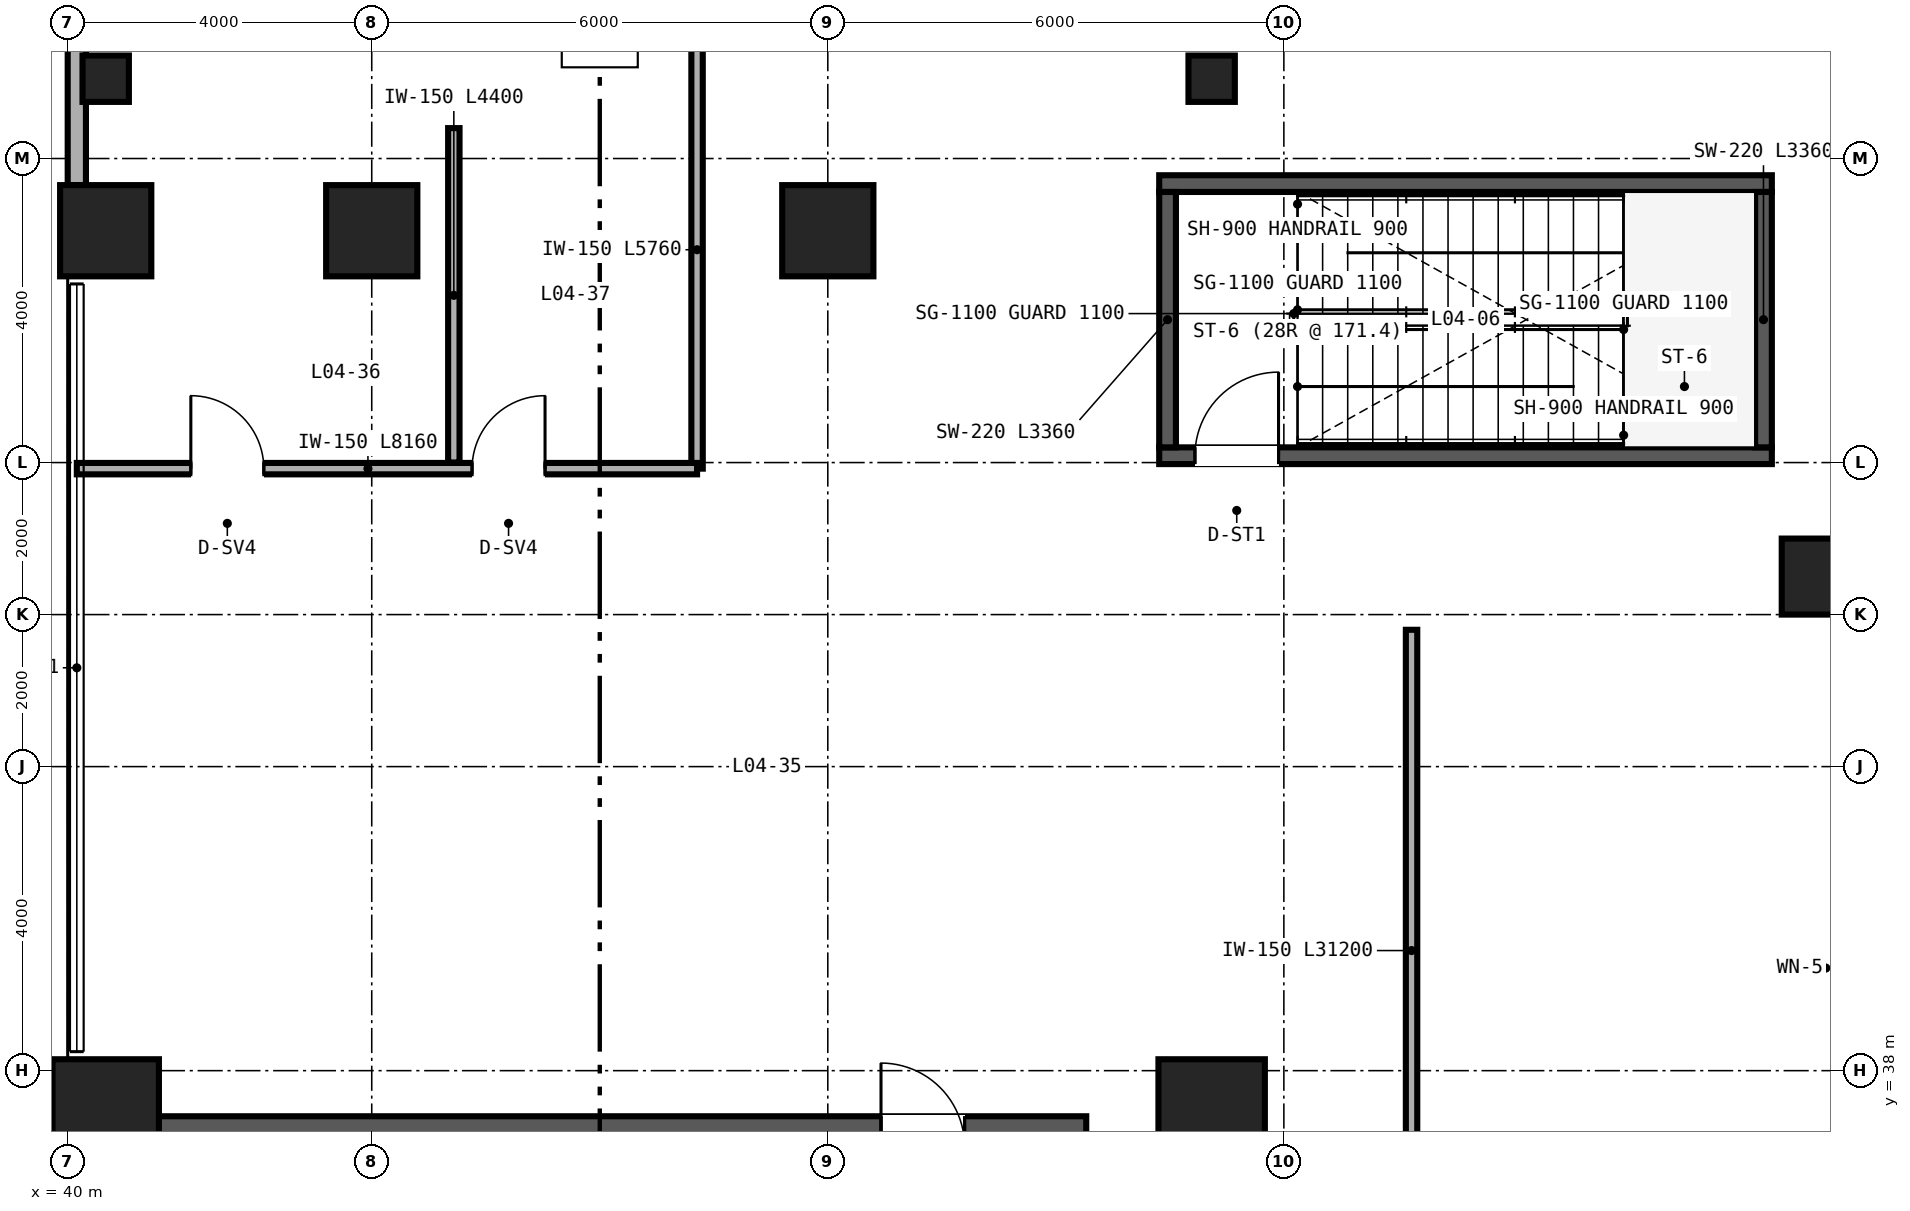
"""IFC4 building model, lengths in metres.
Left out: names, types, materials, properties, quantities, classifications, styles, units other than length and angle.
Written with IfcOpenShell. Run it as: python <this file> out.ifc"""

import sys

from ifc_helpers import new_model, si_unit, direction, frame, frame_2d, origin, origin_2d, place, context, subcontext, project, spatial, rectangle, hollow_circle, extrude, source, transform, mapped, element, fill, save


model = new_model("IFC4")
c1 = context("Model", 3, precision=1e-05, world=origin(), true_north=direction((0.0, 1.0)))
c2 = subcontext(c1, "Body", "Model", "MODEL_VIEW")
j1 = project(units=[si_unit("LENGTHUNIT", "METRE"), si_unit("PLANEANGLEUNIT", "RADIAN")], contexts=[c1])
p1 = place(None, origin())
s1 = spatial("IfcSite", under=j1, at=p1, CompositionType="ELEMENT")
p2 = place(p1, origin())
s2 = spatial("IfcBuilding", under=s1, at=p2, CompositionType="ELEMENT")
p3 = place(p2, frame((0.0, 0.0, 19.2)))
s3 = spatial("IfcBuildingStorey", under=s2, at=p3, CompositionType="ELEMENT", Elevation=19.2)
p4 = place(p3, frame((40.6, 37.0, 0.0), z_axis=(0.0, 0.0, 1.0), x_axis=(1.0, 0.0, 0.0)))
e1 = element("IfcWall", 1, at=p4, inside=s3, PredefinedType="SHEAR", context=c2, shape_type="SweptSolid", body=[
    extrude(rectangle(XDim=12.8, YDim=0.8, at=frame_2d((6.4, 0.0))), origin(), (0.0, 0.0, 1.0), 4.48),
])
p5 = place(p4, frame((10.1, 0.0, 0.0)))
e2 = element("IfcOpeningElement", 2, at=p5, cuts=e1, PredefinedType="OPENING", context=c2, shape_type="SweptSolid", body=[
    extrude(rectangle(XDim=1.1, YDim=2.15, at=frame_2d((0.55, 1.075))), frame((0.0, 0.41, 0.0), z_axis=(0.0, -1.0, 0.0), x_axis=(1.0, 0.0, 0.0)), (0.0, 0.0, 1.0), 0.82),
])
p6 = place(p3, frame((54.36, 46.09, 0.0), z_axis=(0.0, 0.0, 1.0), x_axis=(1.0, 0.0, 0.0)))
e3 = element("IfcWall", 3, at=p6, inside=s3, PredefinedType="SHEAR", context=c2, shape_type="SweptSolid", body=[
    extrude(rectangle(XDim=8.06, YDim=0.22, at=frame_2d((4.03, 0.0))), origin(), (0.0, 0.0, 1.0), 4.6),
])
p7 = place(p6, frame((0.47, 0.0, 0.0)))
e4 = element("IfcOpeningElement", 4, at=p7, cuts=e3, PredefinedType="OPENING", context=c2, shape_type="SweptSolid", body=[
    extrude(rectangle(XDim=1.1, YDim=2.15, at=frame_2d((0.55, 1.075))), frame((0.0, 0.12, 0.0), z_axis=(0.0, -1.0, 0.0), x_axis=(1.0, 0.0, 0.0)), (0.0, 0.0, 1.0), 0.24),
])
p8 = place(p3, frame((54.36, 49.67, 0.0), z_axis=(0.0, 0.0, 1.0), x_axis=(1.0, 0.0, 0.0)))
e5 = element("IfcWall", 5, at=p8, inside=s3, PredefinedType="SHEAR", context=c2, shape_type="SweptSolid", body=[
    extrude(rectangle(XDim=8.06, YDim=0.22, at=frame_2d((4.03, 0.0))), origin(), (0.0, 0.0, 1.0), 4.6),
])
for number, where, z_axis, x_axis in (
    (6, (54.47, 46.2, 0.0), (0.0, 0.0, 1.0), (0.0, 1.0, 0.0)),
    (7, (62.31, 46.2, 0.0), (0.0, 0.0, 1.0), (0.0, 1.0, 0.0)),
):
    element("IfcWall", number, at=place(p3, frame(where, z_axis=z_axis, x_axis=x_axis)), inside=s3, PredefinedType="SHEAR", context=c2, shape_type="SweptSolid", body=[
        extrude(rectangle(XDim=3.36, YDim=0.22, at=frame_2d((1.68, 0.0))), origin(), (0.0, 0.0, 1.0), 4.6),
    ])
m1 = source(origin(), c2, "Body", "SweptSolid", [
    extrude(rectangle(XDim=1.0, YDim=1.0, at=origin_2d()), origin(), (0.0, 0.0, 1.0), 4.48),
])
p9 = place(p3, frame((63.05, 44.5, 0.0), z_axis=(0.0, 0.0, 1.0), x_axis=(1.0, 0.0, 0.0)))
e8 = element("IfcColumn", 8, at=p9, inside=s3, PredefinedType="COLUMN", context=c2, shape_type="MappedRepresentation", body=[
    mapped(m1, transform((0.0, 0.0, 0.0), scale=1.0)),
])
m2 = source(origin(), c2, "Body", "SweptSolid", [
    extrude(hollow_circle(Radius=0.305, WallThickness=0.025, at=origin_2d()), origin(), (0.0, 0.0, 1.0), 4.48),
])
for number, where, z_axis, x_axis in (
    (9, (40.5, 51.05, 0.0), (0.0, 0.0, 1.0), (1.0, 0.0, 0.0)),
    (10, (55.05, 51.05, 0.0), (0.0, 0.0, 1.0), (1.0, 0.0, 0.0)),
):
    element("IfcColumn", number, at=place(p3, frame(where, z_axis=z_axis, x_axis=x_axis)), inside=s3, PredefinedType="COLUMN", context=c2, shape_type="MappedRepresentation", body=[
        mapped(m2, transform((0.0, 0.0, 0.0), scale=1.0)),
    ])
m3 = source(origin(), c2, "Body", "SweptSolid", [
    extrude(rectangle(XDim=1.4, YDim=1.4, at=origin_2d()), origin(), (0.0, 0.0, 1.0), 4.48),
])
for number, where, z_axis, x_axis in (
    (11, (40.5, 37.45, 0.0), (0.0, 0.0, 1.0), (1.0, 0.0, 0.0)),
    (12, (55.05, 37.45, 0.0), (0.0, 0.0, 1.0), (1.0, 0.0, 0.0)),
):
    element("IfcColumn", number, at=place(p3, frame(where, z_axis=z_axis, x_axis=x_axis)), inside=s3, PredefinedType="COLUMN", context=c2, shape_type="MappedRepresentation", body=[
        mapped(m3, transform((0.0, 0.0, 0.0), scale=1.0)),
    ])
m4 = source(origin(), c2, "Body", "SweptSolid", [
    extrude(rectangle(XDim=1.2, YDim=1.2, at=origin_2d()), origin(), (0.0, 0.0, 1.0), 4.48),
])
for number, where, z_axis, x_axis in (
    (13, (40.5, 49.05, 0.0), (0.0, 0.0, 1.0), (1.0, 0.0, 0.0)),
    (14, (44.0, 49.05, 0.0), (0.0, 0.0, 1.0), (1.0, 0.0, 0.0)),
    (15, (50.0, 49.05, 0.0), (0.0, 0.0, 1.0), (1.0, 0.0, 0.0)),
):
    element("IfcColumn", number, at=place(p3, frame(where, z_axis=z_axis, x_axis=x_axis)), inside=s3, PredefinedType="COLUMN", context=c2, shape_type="MappedRepresentation", body=[
        mapped(m4, transform((0.0, 0.0, 0.0), scale=1.0)),
    ])
p10 = place(p3, frame((40.12, 49.65, 0.0), z_axis=(0.0, 0.0, 1.0), x_axis=(0.0, 1.0, 0.0)))
e16 = element("IfcWall", 16, at=p10, inside=s3, PredefinedType="SOLIDWALL", context=c2, shape_type="SweptSolid", body=[
    extrude(rectangle(XDim=2.05, YDim=0.24, at=frame_2d((1.025, 0.0))), origin(), (0.0, 0.0, 1.0), 3.532),
])
p11 = place(p3, frame((45.08, 46.0, 0.0), z_axis=(0.0, 0.0, 1.0), x_axis=(0.0, 1.0, 0.0)))
e17 = element("IfcWall", 17, at=p11, inside=s3, PredefinedType="PARTITIONING", context=c2, shape_type="SweptSolid", body=[
    extrude(rectangle(XDim=4.4, YDim=0.15, at=frame_2d((2.2, 0.0))), origin(), (0.0, 0.0, 1.0), 3.787),
])
p12 = place(p3, frame((48.28, 45.92, 0.0), z_axis=(0.0, 0.0, 1.0), x_axis=(0.0, 1.0, 0.0)))
e18 = element("IfcWall", 18, at=p12, inside=s3, PredefinedType="PARTITIONING", context=c2, shape_type="SweptSolid", body=[
    extrude(rectangle(XDim=5.76, YDim=0.15, at=frame_2d((2.88, 0.0))), origin(), (0.0, 0.0, 1.0), 3.553),
])
p13 = place(p3, frame((40.12, 45.92, 0.0), z_axis=(0.0, 0.0, 1.0), x_axis=(1.0, 0.0, 0.0)))
e19 = element("IfcWall", 19, at=p13, inside=s3, PredefinedType="PARTITIONING", context=c2, shape_type="SweptSolid", body=[
    extrude(rectangle(XDim=8.16, YDim=0.15, at=frame_2d((4.08, 0.0))), origin(), (0.0, 0.0, 1.0), 3.701),
])
p14 = place(p13, frame((1.5, 0.0, 0.0)))
e20 = element("IfcOpeningElement", 20, at=p14, cuts=e19, PredefinedType="OPENING", context=c2, shape_type="SweptSolid", body=[
    extrude(rectangle(XDim=0.96, YDim=2.15, at=frame_2d((0.48, 1.075))), frame((0.0, 0.085, 0.0), z_axis=(0.0, -1.0, 0.0), x_axis=(1.0, 0.0, 0.0)), (0.0, 0.0, 1.0), 0.17),
])
p15 = place(p13, frame((5.2, 0.0, 0.0)))
e21 = element("IfcOpeningElement", 21, at=p15, cuts=e19, PredefinedType="OPENING", context=c2, shape_type="SweptSolid", body=[
    extrude(rectangle(XDim=0.96, YDim=2.15, at=frame_2d((0.48, 1.075))), frame((0.0, 0.085, 0.0), z_axis=(0.0, -1.0, 0.0), x_axis=(1.0, 0.0, 0.0)), (0.0, 0.0, 1.0), 0.17),
])
p16 = place(p3, frame((57.68, 12.6, 0.0), z_axis=(0.0, 0.0, 1.0), x_axis=(0.0, 1.0, 0.0)))
e22 = element("IfcWall", 22, at=p16, inside=s3, PredefinedType="PARTITIONING", context=c2, shape_type="SweptSolid", body=[
    extrude(rectangle(XDim=31.2, YDim=0.15, at=frame_2d((15.6, 0.0))), origin(), (0.0, 0.0, 1.0), 4.48),
])
p17 = place(p16, frame((3.8, 0.0, 0.0)))
e23 = element("IfcOpeningElement", 23, at=p17, cuts=e22, PredefinedType="OPENING", context=c2, shape_type="SweptSolid", body=[
    extrude(rectangle(XDim=0.96, YDim=2.15, at=frame_2d((0.48, 1.075))), frame((0.0, 0.085, 0.0), z_axis=(0.0, -1.0, 0.0), x_axis=(1.0, 0.0, 0.0)), (0.0, 0.0, 1.0), 0.17),
])
p18 = place(p16, frame((9.8, 0.0, 0.0)))
e24 = element("IfcOpeningElement", 24, at=p18, cuts=e22, PredefinedType="OPENING", context=c2, shape_type="SweptSolid", body=[
    extrude(rectangle(XDim=0.96, YDim=2.15, at=frame_2d((0.48, 1.075))), frame((0.0, 0.085, 0.0), z_axis=(0.0, -1.0, 0.0), x_axis=(1.0, 0.0, 0.0)), (0.0, 0.0, 1.0), 0.17),
])
p19 = place(p16, frame((15.8, 0.0, 0.0)))
e25 = element("IfcOpeningElement", 25, at=p19, cuts=e22, PredefinedType="OPENING", context=c2, shape_type="SweptSolid", body=[
    extrude(rectangle(XDim=0.96, YDim=2.15, at=frame_2d((0.48, 1.075))), frame((0.0, 0.085, 0.0), z_axis=(0.0, -1.0, 0.0), x_axis=(1.0, 0.0, 0.0)), (0.0, 0.0, 1.0), 0.17),
])
p20 = place(p16, frame((21.8, 0.0, 0.0)))
e26 = element("IfcOpeningElement", 26, at=p20, cuts=e22, PredefinedType="OPENING", context=c2, shape_type="SweptSolid", body=[
    extrude(rectangle(XDim=0.96, YDim=2.15, at=frame_2d((0.48, 1.075))), frame((0.0, 0.085, 0.0), z_axis=(0.0, -1.0, 0.0), x_axis=(1.0, 0.0, 0.0)), (0.0, 0.0, 1.0), 0.17),
])
m5 = source(origin(), c2, "Body", "SweptSolid", [
    extrude(rectangle(XDim=1.1, YDim=2.15, at=frame_2d((0.55, 1.075))), frame((0.0, 0.025, 0.0), z_axis=(0.0, -1.0, 0.0), x_axis=(1.0, 0.0, 0.0)), (0.0, 0.0, 1.0), 0.05),
])
p21 = place(p7, origin())
e27 = element("IfcDoor", 27, at=p21, inside=s3, OperationType="SINGLE_SWING_RIGHT", PredefinedType="DOOR", context=c2, shape_type="MappedRepresentation", body=[
    mapped(m5, transform((0.0, 0.0, 0.0), scale=1.0)),
])
fill(e4, e27)
m6 = source(origin(), c2, "Body", "SweptSolid", [
    extrude(rectangle(XDim=0.96, YDim=2.15, at=frame_2d((0.48, 1.075))), frame((0.0, 0.025, 0.0), z_axis=(0.0, -1.0, 0.0), x_axis=(1.0, 0.0, 0.0)), (0.0, 0.0, 1.0), 0.05),
])
p22 = place(p14, origin())
e28 = element("IfcDoor", 28, at=p22, inside=s3, OperationType="SINGLE_SWING_LEFT", PredefinedType="DOOR", context=c2, shape_type="MappedRepresentation", body=[
    mapped(m6, transform((0.0, 0.0, 0.0), scale=1.0)),
])
fill(e20, e28)
p23 = place(p15, origin())
e29 = element("IfcDoor", 29, at=p23, inside=s3, OperationType="SINGLE_SWING_RIGHT", PredefinedType="DOOR", context=c2, shape_type="MappedRepresentation", body=[
    mapped(m6, transform((0.0, 0.0, 0.0), scale=1.0)),
])
fill(e21, e29)
save(model, sys.argv[1])
